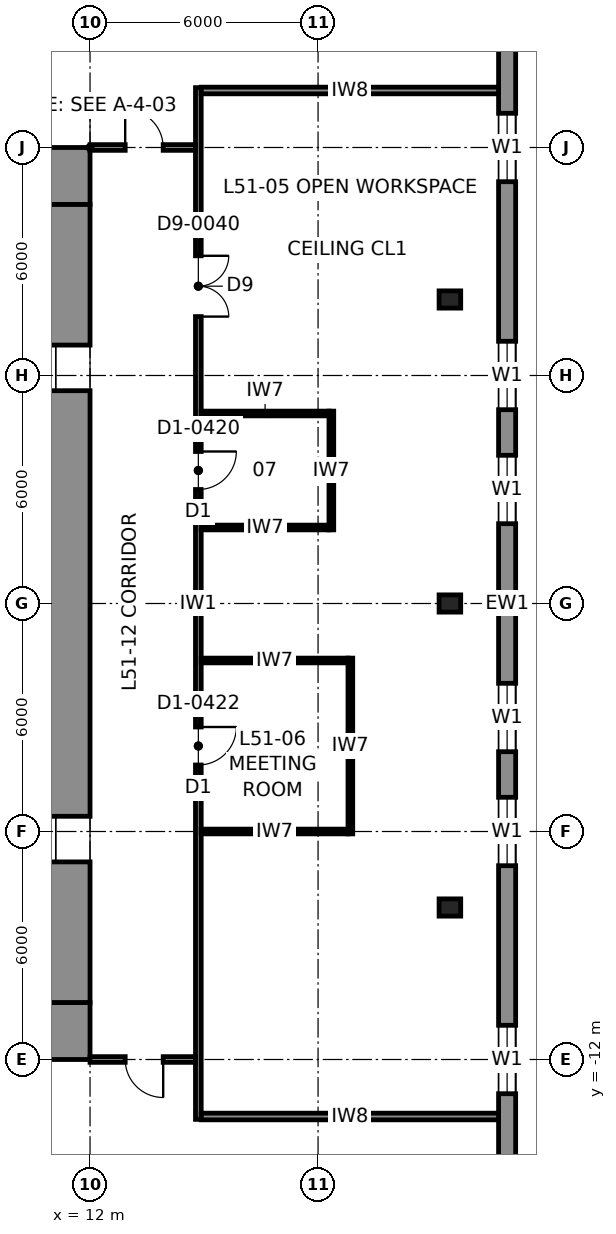
"""IFC4 building model, lengths in metres.
Left out: names, types, materials, properties, quantities, classifications, styles, units other than length and angle.
Written with IfcOpenShell. Run it as: python <this file> out.ifc"""

import sys

from ifc_helpers import new_model, si_unit, direction, frame, frame_2d, origin, origin_2d, place, context, subcontext, project, spatial, rectangle, i_section, extrude, element, fill, save


model = new_model("IFC4")
c1 = context("Model", 3, precision=1e-05, world=origin(), true_north=direction((0.0, 1.0)))
c2 = subcontext(c1, "Body", "Model", "MODEL_VIEW")
j1 = project(units=[si_unit("LENGTHUNIT", "METRE"), si_unit("PLANEANGLEUNIT", "RADIAN")], contexts=[c1])
p1 = place(None, origin())
s1 = spatial("IfcSite", under=j1, at=p1, CompositionType="ELEMENT")
p2 = place(p1, origin())
s2 = spatial("IfcBuilding", under=s1, at=p2, CompositionType="ELEMENT")
p3 = place(p2, frame((0.0, 0.0, 233.8)))
s3 = spatial("IfcBuildingStorey", under=s2, at=p3, CompositionType="ELEMENT", Elevation=233.8)
for number, where, z_axis, x_axis in (
    (1, (21.469, 0.0, 0.0), (-0.04, 0.0, 0.999), (0.0, -1.0, 0.0)),
    (2, (21.469, -8.0, 0.0), (-0.04, 0.0, 0.999), (0.0, -1.0, 0.0)),
    (3, (21.469, 8.0, 0.0), (-0.04, 0.0, 0.999), (0.0, -1.0, 0.0)),
):
    element("IfcColumn", number, at=place(p3, frame(where, z_axis=z_axis, x_axis=x_axis)), inside=s3, PredefinedType="COLUMN", context=c2, shape_type="SweptSolid", body=[
        extrude(i_section(OverallWidth=0.454, OverallDepth=0.569, WebThickness=0.078, FlangeThickness=0.125, at=origin_2d()), origin(), (0.0, 0.0, 1.0), 4.003),
    ])
for number, where, z_axis, x_axis in (
    (4, (-12.0, 11.25, 0.0), (0.0, 0.0, 1.0), (1.0, 0.0, 0.0)),
    (5, (12.0, -11.25, 0.0), (0.0, 0.0, 1.0), (-1.0, 0.0, 0.0)),
):
    element("IfcWall", number, at=place(p3, frame(where, z_axis=z_axis, x_axis=x_axis)), inside=s3, PredefinedType="SHEAR", context=c2, shape_type="SweptSolid", body=[
        extrude(rectangle(XDim=24.0, YDim=1.5, at=frame_2d((12.0, 0.0))), origin(), (0.0, 0.0, 1.0), 4.0),
    ])
p4 = place(p3, frame((11.25, 10.5, 0.0), z_axis=(0.0, 0.0, 1.0), x_axis=(0.0, -1.0, 0.0)))
e6 = element("IfcWall", 6, at=p4, inside=s3, PredefinedType="SHEAR", context=c2, shape_type="SweptSolid", body=[
    extrude(rectangle(XDim=21.0, YDim=1.5, at=frame_2d((10.5, 0.0))), origin(), (0.0, 0.0, 1.0), 4.0),
])
p5 = place(p4, frame((3.7, 0.0, 0.0)))
e7 = element("IfcOpeningElement", 7, at=p5, cuts=e6, PredefinedType="OPENING", context=c2, shape_type="SweptSolid", body=[
    extrude(rectangle(XDim=1.2, YDim=2.3, at=frame_2d((0.6, 1.15))), frame((0.0, 0.76, 0.0), z_axis=(0.0, -1.0, 0.0), x_axis=(1.0, 0.0, 0.0)), (0.0, 0.0, 1.0), 1.52),
])
p6 = place(p4, frame((16.1, 0.0, 0.0)))
e8 = element("IfcOpeningElement", 8, at=p6, cuts=e6, PredefinedType="OPENING", context=c2, shape_type="SweptSolid", body=[
    extrude(rectangle(XDim=1.2, YDim=2.3, at=frame_2d((0.6, 1.15))), frame((0.0, 0.76, 0.0), z_axis=(0.0, -1.0, 0.0), x_axis=(1.0, 0.0, 0.0)), (0.0, 0.0, 1.0), 1.52),
])
p7 = place(p3, frame((22.975, -18.7, 0.0), z_axis=(0.0, 0.0, 1.0), x_axis=(0.0, 1.0, 0.0)))
e9 = element("IfcWall", 9, at=p7, inside=s3, PredefinedType="SOLIDWALL", context=c2, shape_type="SweptSolid", body=[
    extrude(rectangle(XDim=37.4, YDim=0.45, at=frame_2d((18.7, 0.0))), origin(), (0.0, 0.0, 1.0), 3.83),
])
p8 = place(p7, frame((5.8, 0.0, 0.7)))
e10 = element("IfcOpeningElement", 10, at=p8, cuts=e9, PredefinedType="OPENING", context=c2, shape_type="SweptSolid", body=[
    extrude(rectangle(XDim=1.8, YDim=2.6, at=frame_2d((0.9, 1.3))), frame((0.0, 0.235, 0.0), z_axis=(0.0, -1.0, 0.0), x_axis=(1.0, 0.0, 0.0)), (0.0, 0.0, 1.0), 0.47),
])
p9 = place(p7, frame((11.8, 0.0, 0.7)))
e11 = element("IfcOpeningElement", 11, at=p9, cuts=e9, PredefinedType="OPENING", context=c2, shape_type="SweptSolid", body=[
    extrude(rectangle(XDim=1.8, YDim=2.6, at=frame_2d((0.9, 1.3))), frame((0.0, 0.235, 0.0), z_axis=(0.0, -1.0, 0.0), x_axis=(1.0, 0.0, 0.0)), (0.0, 0.0, 1.0), 0.47),
])
p10 = place(p7, frame((14.8, 0.0, 0.7)))
e12 = element("IfcOpeningElement", 12, at=p10, cuts=e9, PredefinedType="OPENING", context=c2, shape_type="SweptSolid", body=[
    extrude(rectangle(XDim=1.8, YDim=2.6, at=frame_2d((0.9, 1.3))), frame((0.0, 0.235, 0.0), z_axis=(0.0, -1.0, 0.0), x_axis=(1.0, 0.0, 0.0)), (0.0, 0.0, 1.0), 0.47),
])
p11 = place(p7, frame((20.8, 0.0, 0.7)))
e13 = element("IfcOpeningElement", 13, at=p11, cuts=e9, PredefinedType="OPENING", context=c2, shape_type="SweptSolid", body=[
    extrude(rectangle(XDim=1.8, YDim=2.6, at=frame_2d((0.9, 1.3))), frame((0.0, 0.235, 0.0), z_axis=(0.0, -1.0, 0.0), x_axis=(1.0, 0.0, 0.0)), (0.0, 0.0, 1.0), 0.47),
])
p12 = place(p7, frame((23.8, 0.0, 0.7)))
e14 = element("IfcOpeningElement", 14, at=p12, cuts=e9, PredefinedType="OPENING", context=c2, shape_type="SweptSolid", body=[
    extrude(rectangle(XDim=1.8, YDim=2.6, at=frame_2d((0.9, 1.3))), frame((0.0, 0.235, 0.0), z_axis=(0.0, -1.0, 0.0), x_axis=(1.0, 0.0, 0.0)), (0.0, 0.0, 1.0), 0.47),
])
p13 = place(p7, frame((29.8, 0.0, 0.7)))
e15 = element("IfcOpeningElement", 15, at=p13, cuts=e9, PredefinedType="OPENING", context=c2, shape_type="SweptSolid", body=[
    extrude(rectangle(XDim=1.8, YDim=2.6, at=frame_2d((0.9, 1.3))), frame((0.0, 0.235, 0.0), z_axis=(0.0, -1.0, 0.0), x_axis=(1.0, 0.0, 0.0)), (0.0, 0.0, 1.0), 0.47),
])
p14 = place(p3, frame((14.85, -13.575, 0.0), z_axis=(0.0, 0.0, 1.0), x_axis=(0.0, 1.0, 0.0)))
e16 = element("IfcWall", 16, at=p14, inside=s3, PredefinedType="PARTITIONING", context=c2, shape_type="SweptSolid", body=[
    extrude(rectangle(XDim=27.15, YDim=0.15, at=frame_2d((13.575, 0.0))), origin(), (0.0, 0.0, 1.0), 3.83),
])
p15 = place(p14, frame((21.125, 0.0, 0.0)))
e17 = element("IfcOpeningElement", 17, at=p15, cuts=e16, PredefinedType="OPENING", context=c2, shape_type="SweptSolid", body=[
    extrude(rectangle(XDim=1.6, YDim=2.3, at=frame_2d((0.8, 1.15))), frame((0.0, 0.085, 0.0), z_axis=(0.0, -1.0, 0.0), x_axis=(1.0, 0.0, 0.0)), (0.0, 0.0, 1.0), 0.17),
])
p16 = place(p14, frame((9.325, 0.0, 0.0)))
e18 = element("IfcOpeningElement", 18, at=p16, cuts=e16, PredefinedType="OPENING", context=c2, shape_type="SweptSolid", body=[
    extrude(rectangle(XDim=1.0, YDim=2.3, at=frame_2d((0.5, 1.15))), frame((0.0, 0.085, 0.0), z_axis=(0.0, -1.0, 0.0), x_axis=(1.0, 0.0, 0.0)), (0.0, 0.0, 1.0), 0.17),
])
p17 = place(p14, frame((16.575, 0.0, 0.0)))
e19 = element("IfcOpeningElement", 19, at=p17, cuts=e16, PredefinedType="OPENING", context=c2, shape_type="SweptSolid", body=[
    extrude(rectangle(XDim=1.0, YDim=2.3, at=frame_2d((0.5, 1.15))), frame((0.0, 0.085, 0.0), z_axis=(0.0, -1.0, 0.0), x_axis=(1.0, 0.0, 0.0)), (0.0, 0.0, 1.0), 0.17),
])
p18 = place(p3, frame((12.0, 12.0, 0.0), z_axis=(0.0, 0.0, 1.0), x_axis=(1.0, 0.0, 0.0)))
e20 = element("IfcWall", 20, at=p18, inside=s3, PredefinedType="PARTITIONING", context=c2, shape_type="SweptSolid", body=[
    extrude(rectangle(XDim=2.775, YDim=0.15, at=frame_2d((1.387, 0.0))), origin(), (0.0, 0.0, 1.0), 3.83),
])
p19 = place(p18, frame((0.925, 0.0, 0.0)))
e21 = element("IfcOpeningElement", 21, at=p19, cuts=e20, PredefinedType="OPENING", context=c2, shape_type="SweptSolid", body=[
    extrude(rectangle(XDim=1.0, YDim=2.3, at=frame_2d((0.5, 1.15))), frame((0.0, 0.085, 0.0), z_axis=(0.0, -1.0, 0.0), x_axis=(1.0, 0.0, 0.0)), (0.0, 0.0, 1.0), 0.17),
])
p20 = place(p3, frame((14.775, -12.0, 0.0), z_axis=(0.0, 0.0, 1.0), x_axis=(-1.0, 0.0, 0.0)))
e22 = element("IfcWall", 22, at=p20, inside=s3, PredefinedType="PARTITIONING", context=c2, shape_type="SweptSolid", body=[
    extrude(rectangle(XDim=2.775, YDim=0.15, at=frame_2d((1.387, 0.0))), origin(), (0.0, 0.0, 1.0), 3.83),
])
p21 = place(p20, frame((0.85, 0.0, 0.0)))
e23 = element("IfcOpeningElement", 23, at=p21, cuts=e22, PredefinedType="OPENING", context=c2, shape_type="SweptSolid", body=[
    extrude(rectangle(XDim=1.0, YDim=2.3, at=frame_2d((0.5, 1.15))), frame((0.0, 0.085, 0.0), z_axis=(0.0, -1.0, 0.0), x_axis=(1.0, 0.0, 0.0)), (0.0, 0.0, 1.0), 0.17),
])
for number, where, z_axis, x_axis in (
    (24, (14.925, 13.5, 0.0), (0.0, 0.0, 1.0), (1.0, 0.0, 0.0)),
    (25, (22.75, -13.5, 0.0), (0.0, 0.0, 1.0), (-1.0, 0.0, 0.0)),
):
    element("IfcWall", number, at=place(p3, frame(where, z_axis=z_axis, x_axis=x_axis)), inside=s3, PredefinedType="PARTITIONING", context=c2, shape_type="SweptSolid", body=[
        extrude(rectangle(XDim=7.825, YDim=0.175, at=frame_2d((3.913, 0.0))), origin(), (0.0, 0.0, 1.0), 3.83),
    ])
p22 = place(p3, frame((18.85, -6.062, 0.0), z_axis=(0.0, 0.0, 1.0), x_axis=(0.0, 1.0, 0.0)))
e26 = element("IfcWall", 26, at=p22, inside=s3, PredefinedType="PARTITIONING", context=c2, shape_type="SweptSolid", body=[
    extrude(rectangle(XDim=4.625, YDim=0.125, at=frame_2d((2.312, 0.0))), origin(), (0.0, 0.0, 1.0), 3.83),
])
for number, where, z_axis, x_axis in (
    (27, (14.925, -6.0, 0.0), (0.0, 0.0, 1.0), (1.0, 0.0, 0.0)),
    (28, (14.925, -1.5, 0.0), (0.0, 0.0, 1.0), (1.0, 0.0, 0.0)),
):
    element("IfcWall", number, at=place(p3, frame(where, z_axis=z_axis, x_axis=x_axis)), inside=s3, PredefinedType="PARTITIONING", context=c2, shape_type="SweptSolid", body=[
        extrude(rectangle(XDim=3.863, YDim=0.125, at=frame_2d((1.931, 0.0))), origin(), (0.0, 0.0, 1.0), 3.83),
    ])
p23 = place(p3, frame((18.35, 1.938, 0.0), z_axis=(0.0, 0.0, 1.0), x_axis=(0.0, 1.0, 0.0)))
e29 = element("IfcWall", 29, at=p23, inside=s3, PredefinedType="PARTITIONING", context=c2, shape_type="SweptSolid", body=[
    extrude(rectangle(XDim=3.125, YDim=0.125, at=frame_2d((1.562, 0.0))), origin(), (0.0, 0.0, 1.0), 3.83),
])
for number, where, z_axis, x_axis in (
    (30, (14.925, 2.0, 0.0), (0.0, 0.0, 1.0), (1.0, 0.0, 0.0)),
    (31, (14.925, 5.0, 0.0), (0.0, 0.0, 1.0), (1.0, 0.0, 0.0)),
):
    element("IfcWall", number, at=place(p3, frame(where, z_axis=z_axis, x_axis=x_axis)), inside=s3, PredefinedType="PARTITIONING", context=c2, shape_type="SweptSolid", body=[
        extrude(rectangle(XDim=3.363, YDim=0.125, at=frame_2d((1.681, 0.0))), origin(), (0.0, 0.0, 1.0), 3.83),
    ])
p24 = place(p8, origin())
e32 = element("IfcWindow", 32, at=p24, inside=s3, PartitioningType="SINGLE_PANEL", PredefinedType="WINDOW", context=c2, shape_type="SweptSolid", body=[
    extrude(rectangle(XDim=1.8, YDim=2.6, at=frame_2d((0.9, 1.3))), frame((0.0, 0.03, 0.0), z_axis=(0.0, -1.0, 0.0), x_axis=(1.0, 0.0, 0.0)), (0.0, 0.0, 1.0), 0.06),
])
fill(e10, e32)
p25 = place(p9, origin())
e33 = element("IfcWindow", 33, at=p25, inside=s3, PartitioningType="SINGLE_PANEL", PredefinedType="WINDOW", context=c2, shape_type="SweptSolid", body=[
    extrude(rectangle(XDim=1.8, YDim=2.6, at=frame_2d((0.9, 1.3))), frame((0.0, 0.03, 0.0), z_axis=(0.0, -1.0, 0.0), x_axis=(1.0, 0.0, 0.0)), (0.0, 0.0, 1.0), 0.06),
])
fill(e11, e33)
p26 = place(p10, origin())
e34 = element("IfcWindow", 34, at=p26, inside=s3, PartitioningType="SINGLE_PANEL", PredefinedType="WINDOW", context=c2, shape_type="SweptSolid", body=[
    extrude(rectangle(XDim=1.8, YDim=2.6, at=frame_2d((0.9, 1.3))), frame((0.0, 0.03, 0.0), z_axis=(0.0, -1.0, 0.0), x_axis=(1.0, 0.0, 0.0)), (0.0, 0.0, 1.0), 0.06),
])
fill(e12, e34)
p27 = place(p11, origin())
e35 = element("IfcWindow", 35, at=p27, inside=s3, PartitioningType="SINGLE_PANEL", PredefinedType="WINDOW", context=c2, shape_type="SweptSolid", body=[
    extrude(rectangle(XDim=1.8, YDim=2.6, at=frame_2d((0.9, 1.3))), frame((0.0, 0.03, 0.0), z_axis=(0.0, -1.0, 0.0), x_axis=(1.0, 0.0, 0.0)), (0.0, 0.0, 1.0), 0.06),
])
fill(e13, e35)
p28 = place(p12, origin())
e36 = element("IfcWindow", 36, at=p28, inside=s3, PartitioningType="SINGLE_PANEL", PredefinedType="WINDOW", context=c2, shape_type="SweptSolid", body=[
    extrude(rectangle(XDim=1.8, YDim=2.6, at=frame_2d((0.9, 1.3))), frame((0.0, 0.03, 0.0), z_axis=(0.0, -1.0, 0.0), x_axis=(1.0, 0.0, 0.0)), (0.0, 0.0, 1.0), 0.06),
])
fill(e14, e36)
p29 = place(p13, origin())
e37 = element("IfcWindow", 37, at=p29, inside=s3, PartitioningType="SINGLE_PANEL", PredefinedType="WINDOW", context=c2, shape_type="SweptSolid", body=[
    extrude(rectangle(XDim=1.8, YDim=2.6, at=frame_2d((0.9, 1.3))), frame((0.0, 0.03, 0.0), z_axis=(0.0, -1.0, 0.0), x_axis=(1.0, 0.0, 0.0)), (0.0, 0.0, 1.0), 0.06),
])
fill(e15, e37)
p30 = place(p19, origin())
e38 = element("IfcDoor", 38, at=p30, inside=s3, OperationType="SINGLE_SWING_LEFT", PredefinedType="DOOR", context=c2, shape_type="SweptSolid", body=[
    extrude(rectangle(XDim=1.0, YDim=2.3, at=frame_2d((0.5, 1.15))), frame((0.0, 0.025, 0.0), z_axis=(0.0, -1.0, 0.0), x_axis=(1.0, 0.0, 0.0)), (0.0, 0.0, 1.0), 0.05),
])
fill(e21, e38)
p31 = place(p21, origin())
e39 = element("IfcDoor", 39, at=p31, inside=s3, OperationType="SINGLE_SWING_LEFT", PredefinedType="DOOR", context=c2, shape_type="SweptSolid", body=[
    extrude(rectangle(XDim=1.0, YDim=2.3, at=frame_2d((0.5, 1.15))), frame((0.0, 0.025, 0.0), z_axis=(0.0, -1.0, 0.0), x_axis=(1.0, 0.0, 0.0)), (0.0, 0.0, 1.0), 0.05),
])
fill(e23, e39)
p32 = place(p15, frame((1.6, 0.0, 0.0), z_axis=(0.0, 0.0, 1.0), x_axis=(-1.0, 0.0, 0.0)))
e40 = element("IfcDoor", 40, at=p32, inside=s3, OperationType="DOUBLE_DOOR_SINGLE_SWING", PredefinedType="DOOR", context=c2, shape_type="SweptSolid", body=[
    extrude(rectangle(XDim=1.6, YDim=2.3, at=frame_2d((0.8, 1.15))), frame((0.0, 0.025, 0.0), z_axis=(0.0, -1.0, 0.0), x_axis=(1.0, 0.0, 0.0)), (0.0, 0.0, 1.0), 0.05),
])
fill(e17, e40)
p33 = place(p16, frame((1.0, 0.0, 0.0), z_axis=(0.0, 0.0, 1.0), x_axis=(-1.0, 0.0, 0.0)))
e41 = element("IfcDoor", 41, at=p33, inside=s3, OperationType="SINGLE_SWING_LEFT", PredefinedType="DOOR", context=c2, shape_type="SweptSolid", body=[
    extrude(rectangle(XDim=1.0, YDim=2.3, at=frame_2d((0.5, 1.15))), frame((0.0, 0.025, 0.0), z_axis=(0.0, -1.0, 0.0), x_axis=(1.0, 0.0, 0.0)), (0.0, 0.0, 1.0), 0.05),
])
fill(e18, e41)
p34 = place(p17, frame((1.0, 0.0, 0.0), z_axis=(0.0, 0.0, 1.0), x_axis=(-1.0, 0.0, 0.0)))
e42 = element("IfcDoor", 42, at=p34, inside=s3, OperationType="SINGLE_SWING_LEFT", PredefinedType="DOOR", context=c2, shape_type="SweptSolid", body=[
    extrude(rectangle(XDim=1.0, YDim=2.3, at=frame_2d((0.5, 1.15))), frame((0.0, 0.025, 0.0), z_axis=(0.0, -1.0, 0.0), x_axis=(1.0, 0.0, 0.0)), (0.0, 0.0, 1.0), 0.05),
])
fill(e19, e42)
p35 = place(p5, frame((1.2, 0.0, 0.0), z_axis=(0.0, 0.0, 1.0), x_axis=(-1.0, 0.0, 0.0)))
e43 = element("IfcDoor", 43, at=p35, inside=s3, OperationType="SINGLE_SWING_LEFT", PredefinedType="DOOR", context=c2, shape_type="SweptSolid", body=[
    extrude(rectangle(XDim=1.2, YDim=2.3, at=frame_2d((0.6, 1.15))), frame((0.0, 0.025, 0.0), z_axis=(0.0, -1.0, 0.0), x_axis=(1.0, 0.0, 0.0)), (0.0, 0.0, 1.0), 0.05),
])
fill(e7, e43)
p36 = place(p6, frame((1.2, 0.0, 0.0), z_axis=(0.0, 0.0, 1.0), x_axis=(-1.0, 0.0, 0.0)))
e44 = element("IfcDoor", 44, at=p36, inside=s3, OperationType="SINGLE_SWING_LEFT", PredefinedType="DOOR", context=c2, shape_type="SweptSolid", body=[
    extrude(rectangle(XDim=1.2, YDim=2.3, at=frame_2d((0.6, 1.15))), frame((0.0, 0.025, 0.0), z_axis=(0.0, -1.0, 0.0), x_axis=(1.0, 0.0, 0.0)), (0.0, 0.0, 1.0), 0.05),
])
fill(e8, e44)
save(model, sys.argv[1])
